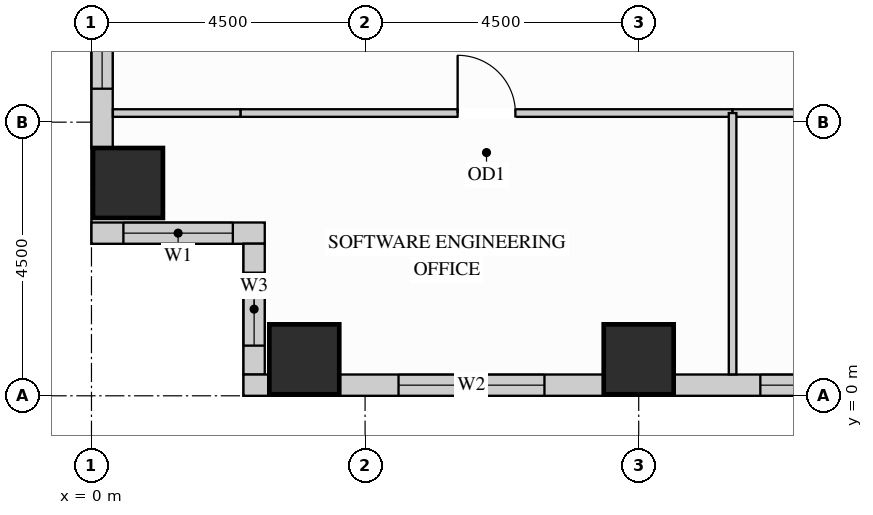
"""IFC4 building model, lengths in metres.
Left out: names, types, materials, properties, quantities, classifications, styles, units other than length and angle.
Written with IfcOpenShell. Run it as: python <this file> out.ifc"""

import sys

from ifc_helpers import new_model, si_unit, direction, frame, frame_2d, origin, origin_2d, place, context, subcontext, project, spatial, rectangle, extrude, source, transform, mapped, element, fill, save


model = new_model("IFC4")
c1 = context("Model", 3, precision=1e-05, world=origin(), true_north=direction((0.0, 1.0)))
c2 = subcontext(c1, "Body", "Model", "MODEL_VIEW")
j1 = project(units=[si_unit("LENGTHUNIT", "METRE"), si_unit("PLANEANGLEUNIT", "RADIAN")], contexts=[c1])
p1 = place(None, origin())
s1 = spatial("IfcSite", under=j1, at=p1, CompositionType="ELEMENT")
p2 = place(p1, origin())
s2 = spatial("IfcBuilding", under=s1, at=p2, CompositionType="ELEMENT")
p3 = place(p2, frame((0.0, 0.0, 77.4)))
s3 = spatial("IfcBuildingStorey", under=s2, at=p3, CompositionType="ELEMENT", Elevation=77.4)
m1 = source(origin(), c2, "Body", "SweptSolid", [
    extrude(rectangle(XDim=1.15, YDim=1.15, at=origin_2d()), origin(), (0.0, 0.0, 1.0), 3.38),
])
for number, where, z_axis, x_axis in (
    (1, (3.5, 0.6, 0.0), (0.0, 0.0, 1.0), (1.0, 0.0, 0.0)),
    (2, (9.0, 0.6, 0.0), (0.0, 0.0, 1.0), (1.0, 0.0, 0.0)),
    (3, (0.6, 3.5, 0.0), (0.0, 0.0, 1.0), (1.0, 0.0, 0.0)),
):
    element("IfcColumn", number, at=place(p3, frame(where, z_axis=z_axis, x_axis=x_axis)), inside=s3, PredefinedType="COLUMN", context=c2, shape_type="MappedRepresentation", body=[
        mapped(m1, transform((0.0, 0.0, 0.0), x_axis=(1.0, 0.0, 0.0), y_axis=(0.0, 1.0, 0.0), z_axis=(0.0, 0.0, 1.0))),
    ])
p4 = place(p3, frame((0.175, 7.927, 0.0), z_axis=(0.0, 0.0, 1.0), x_axis=(0.0, -1.0, 0.0)))
e4 = element("IfcWall", 4, at=p4, inside=s3, PredefinedType="SOLIDWALL", context=c2, shape_type="SweptSolid", body=[
    extrude(rectangle(XDim=3.854, YDim=0.35, at=frame_2d((1.927, 0.0))), origin(), (0.0, 0.0, 1.0), 3.365),
])
p5 = place(p4, frame((0.477, 0.0, 0.78)))
e5 = element("IfcOpeningElement", 5, at=p5, cuts=e4, PredefinedType="OPENING", context=c2, shape_type="SweptSolid", body=[
    extrude(rectangle(XDim=2.4, YDim=2.1, at=frame_2d((1.2, 1.05))), frame((0.0, 0.185, 0.0), z_axis=(0.0, -1.0, 0.0), x_axis=(1.0, 0.0, 0.0)), (0.0, 0.0, 1.0), 0.37),
])
p6 = place(p3, frame((0.0, 2.675, 0.0), z_axis=(0.0, 0.0, 1.0), x_axis=(1.0, 0.0, 0.0)))
e6 = element("IfcWall", 6, at=p6, inside=s3, PredefinedType="SOLIDWALL", context=c2, shape_type="SweptSolid", body=[
    extrude(rectangle(XDim=2.85, YDim=0.35, at=frame_2d((1.425, 0.0))), origin(), (0.0, 0.0, 1.0), 3.365),
])
p7 = place(p6, frame((0.525, 0.0, 0.78)))
e7 = element("IfcOpeningElement", 7, at=p7, cuts=e6, PredefinedType="OPENING", context=c2, shape_type="SweptSolid", body=[
    extrude(rectangle(XDim=1.8, YDim=2.1, at=frame_2d((0.9, 1.05))), frame((0.0, 0.185, 0.0), z_axis=(0.0, -1.0, 0.0), x_axis=(1.0, 0.0, 0.0)), (0.0, 0.0, 1.0), 0.37),
])
p8 = place(p3, frame((2.675, 2.502, 0.0), z_axis=(0.0, 0.0, 1.0), x_axis=(0.0, -1.0, 0.0)))
e8 = element("IfcWall", 8, at=p8, inside=s3, PredefinedType="SOLIDWALL", context=c2, shape_type="SweptSolid", body=[
    extrude(rectangle(XDim=2.154, YDim=0.35, at=frame_2d((1.077, 0.0))), origin(), (0.0, 0.0, 1.0), 3.365),
])
p9 = place(p8, frame((0.477, 0.0, 0.78)))
e9 = element("IfcOpeningElement", 9, at=p9, cuts=e8, PredefinedType="OPENING", context=c2, shape_type="SweptSolid", body=[
    extrude(rectangle(XDim=1.2, YDim=2.1, at=frame_2d((0.6, 1.05))), frame((0.0, 0.185, 0.0), z_axis=(0.0, -1.0, 0.0), x_axis=(1.0, 0.0, 0.0)), (0.0, 0.0, 1.0), 0.37),
])
m2 = source(origin(), c2, "Body", "SweptSolid", [
    extrude(rectangle(XDim=0.427, YDim=0.35, at=frame_2d((0.213, 0.0))), origin(), (0.0, 0.0, 1.0), 3.365),
])
p10 = place(p3, frame((2.5, 0.175, 0.0), z_axis=(0.0, 0.0, 1.0), x_axis=(1.0, 0.0, 0.0)))
e10 = element("IfcWall", 10, at=p10, inside=s3, PredefinedType="SOLIDWALL", context=c2, shape_type="MappedRepresentation", body=[
    mapped(m2, transform((0.0, 0.0, 0.0), x_axis=(1.0, 0.0, 0.0), y_axis=(0.0, 1.0, 0.0), z_axis=(0.0, 0.0, 1.0))),
])
p11 = place(p3, frame((4.073, 0.175, 0.0), z_axis=(0.0, 0.0, 1.0), x_axis=(1.0, 0.0, 0.0)))
e11 = element("IfcWall", 11, at=p11, inside=s3, PredefinedType="SOLIDWALL", context=c2, shape_type="SweptSolid", body=[
    extrude(rectangle(XDim=4.354, YDim=0.35, at=frame_2d((2.177, 0.0))), origin(), (0.0, 0.0, 1.0), 3.365),
])
p12 = place(p11, frame((0.977, 0.0, 0.78)))
e12 = element("IfcOpeningElement", 12, at=p12, cuts=e11, PredefinedType="OPENING", context=c2, shape_type="SweptSolid", body=[
    extrude(rectangle(XDim=2.4, YDim=2.1, at=frame_2d((1.2, 1.05))), frame((0.0, 0.185, 0.0), z_axis=(0.0, -1.0, 0.0), x_axis=(1.0, 0.0, 0.0)), (0.0, 0.0, 1.0), 0.37),
])
p13 = place(p3, frame((9.573, 0.175, 0.0), z_axis=(0.0, 0.0, 1.0), x_axis=(1.0, 0.0, 0.0)))
e13 = element("IfcWall", 13, at=p13, inside=s3, PredefinedType="SOLIDWALL", context=c2, shape_type="SweptSolid", body=[
    extrude(rectangle(XDim=4.354, YDim=0.35, at=frame_2d((2.177, 0.0))), origin(), (0.0, 0.0, 1.0), 3.365),
])
p14 = place(p13, frame((1.427, 0.0, 0.78)))
e14 = element("IfcOpeningElement", 14, at=p14, cuts=e13, PredefinedType="OPENING", context=c2, shape_type="SweptSolid", body=[
    extrude(rectangle(XDim=2.4, YDim=2.1, at=frame_2d((1.2, 1.05))), frame((0.0, 0.185, 0.0), z_axis=(0.0, -1.0, 0.0), x_axis=(1.0, 0.0, 0.0)), (0.0, 0.0, 1.0), 0.37),
])
p15 = place(p3, frame((2.45, 4.65, 0.0), z_axis=(0.0, 0.0, 1.0), x_axis=(1.0, 0.0, 0.0)))
e15 = element("IfcWall", 15, at=p15, inside=s3, PredefinedType="PARTITIONING", context=c2, shape_type="SweptSolid", body=[
    extrude(rectangle(XDim=8.094, YDim=0.125, at=frame_2d((4.047, 0.0))), origin(), (0.0, 0.0, 1.0), 2.828),
])
p16 = place(p15, frame((3.572, 0.0, 0.0)))
e16 = element("IfcOpeningElement", 16, at=p16, cuts=e15, PredefinedType="OPENING", context=c2, shape_type="SweptSolid", body=[
    extrude(rectangle(XDim=0.95, YDim=2.15, at=frame_2d((0.475, 1.075))), frame((0.0, 0.073, 0.0), z_axis=(0.0, -1.0, 0.0), x_axis=(1.0, 0.0, 0.0)), (0.0, 0.0, 1.0), 0.145),
])
p17 = place(p3, frame((10.544, 4.65, 0.0), z_axis=(0.0, 0.0, 1.0), x_axis=(1.0, 0.0, 0.0)))
e17 = element("IfcWall", 17, at=p17, inside=s3, PredefinedType="PARTITIONING", context=c2, shape_type="SweptSolid", body=[
    extrude(rectangle(XDim=6.006, YDim=0.125, at=frame_2d((3.003, 0.0))), origin(), (0.0, 0.0, 1.0), 2.828),
])
p18 = place(p17, frame((2.528, 0.0, 0.0)))
e18 = element("IfcOpeningElement", 18, at=p18, cuts=e17, PredefinedType="OPENING", context=c2, shape_type="SweptSolid", body=[
    extrude(rectangle(XDim=0.95, YDim=2.15, at=frame_2d((0.475, 1.075))), frame((0.0, 0.073, 0.0), z_axis=(0.0, -1.0, 0.0), x_axis=(1.0, 0.0, 0.0)), (0.0, 0.0, 1.0), 0.145),
])
m3 = source(origin(), c2, "Body", "SweptSolid", [
    extrude(rectangle(XDim=2.098, YDim=0.125, at=frame_2d((1.049, 0.0))), origin(), (0.0, 0.0, 1.0), 2.828),
])
p19 = place(p3, frame((0.352, 4.65, 0.0), z_axis=(0.0, 0.0, 1.0), x_axis=(1.0, 0.0, 0.0)))
e19 = element("IfcWall", 19, at=p19, inside=s3, PredefinedType="PARTITIONING", context=c2, shape_type="MappedRepresentation", body=[
    mapped(m3, transform((0.0, 0.0, 0.0), x_axis=(1.0, 0.0, 0.0), y_axis=(0.0, 1.0, 0.0), z_axis=(0.0, 0.0, 1.0))),
])
m4 = source(origin(), c2, "Body", "SweptSolid", [
    extrude(rectangle(XDim=4.298, YDim=0.125, at=frame_2d((2.149, 0.0))), origin(), (0.0, 0.0, 1.0), 3.365),
])
p20 = place(p3, frame((10.544, 0.352, 0.0), z_axis=(0.0, 0.0, 1.0), x_axis=(0.0, 1.0, 0.0)))
e20 = element("IfcWall", 20, at=p20, inside=s3, PredefinedType="PARTITIONING", context=c2, shape_type="MappedRepresentation", body=[
    mapped(m4, transform((0.0, 0.0, 0.0), x_axis=(1.0, 0.0, 0.0), y_axis=(0.0, 1.0, 0.0), z_axis=(0.0, 0.0, 1.0))),
])
m5 = source(origin(), c2, "Body", "SweptSolid", [
    extrude(rectangle(XDim=0.95, YDim=2.15, at=frame_2d((0.475, 1.075))), frame((0.0, 0.025, 0.0), z_axis=(0.0, -1.0, 0.0), x_axis=(1.0, 0.0, 0.0)), (0.0, 0.0, 1.0), 0.05),
])
p21 = place(p16, origin())
e21 = element("IfcDoor", 21, at=p21, inside=s3, OperationType="SINGLE_SWING_LEFT", PredefinedType="DOOR", context=c2, shape_type="MappedRepresentation", body=[
    mapped(m5, transform((0.0, 0.0, 0.0), x_axis=(1.0, 0.0, 0.0), y_axis=(0.0, 1.0, 0.0), z_axis=(0.0, 0.0, 1.0))),
])
fill(e16, e21)
m6 = source(origin(), c2, "Body", "SweptSolid", [
    extrude(rectangle(XDim=1.8, YDim=2.1, at=frame_2d((0.9, 1.05))), frame((0.0, 0.03, 0.0), z_axis=(0.0, -1.0, 0.0), x_axis=(1.0, 0.0, 0.0)), (0.0, 0.0, 1.0), 0.06),
])
p22 = place(p7, origin())
e22 = element("IfcWindow", 22, at=p22, inside=s3, PartitioningType="SINGLE_PANEL", PredefinedType="WINDOW", context=c2, shape_type="MappedRepresentation", body=[
    mapped(m6, transform((0.0, 0.0, 0.0), x_axis=(1.0, 0.0, 0.0), y_axis=(0.0, 1.0, 0.0), z_axis=(0.0, 0.0, 1.0))),
])
fill(e7, e22)
m7 = source(origin(), c2, "Body", "SweptSolid", [
    extrude(rectangle(XDim=2.4, YDim=2.1, at=frame_2d((1.2, 1.05))), frame((0.0, 0.03, 0.0), z_axis=(0.0, -1.0, 0.0), x_axis=(1.0, 0.0, 0.0)), (0.0, 0.0, 1.0), 0.06),
])
p23 = place(p5, origin())
e23 = element("IfcWindow", 23, at=p23, inside=s3, PartitioningType="SINGLE_PANEL", PredefinedType="WINDOW", context=c2, shape_type="MappedRepresentation", body=[
    mapped(m7, transform((0.0, 0.0, 0.0), x_axis=(1.0, 0.0, 0.0), y_axis=(0.0, 1.0, 0.0), z_axis=(0.0, 0.0, 1.0))),
])
fill(e5, e23)
p24 = place(p12, origin())
e24 = element("IfcWindow", 24, at=p24, inside=s3, PartitioningType="SINGLE_PANEL", PredefinedType="WINDOW", context=c2, shape_type="MappedRepresentation", body=[
    mapped(m7, transform((0.0, 0.0, 0.0), x_axis=(1.0, 0.0, 0.0), y_axis=(0.0, 1.0, 0.0), z_axis=(0.0, 0.0, 1.0))),
])
fill(e12, e24)
p25 = place(p14, origin())
e25 = element("IfcWindow", 25, at=p25, inside=s3, PartitioningType="SINGLE_PANEL", PredefinedType="WINDOW", context=c2, shape_type="MappedRepresentation", body=[
    mapped(m7, transform((0.0, 0.0, 0.0), x_axis=(1.0, 0.0, 0.0), y_axis=(0.0, 1.0, 0.0), z_axis=(0.0, 0.0, 1.0))),
])
fill(e14, e25)
m8 = source(origin(), c2, "Body", "SweptSolid", [
    extrude(rectangle(XDim=1.2, YDim=2.1, at=frame_2d((0.6, 1.05))), frame((0.0, 0.03, 0.0), z_axis=(0.0, -1.0, 0.0), x_axis=(1.0, 0.0, 0.0)), (0.0, 0.0, 1.0), 0.06),
])
p26 = place(p9, origin())
e26 = element("IfcWindow", 26, at=p26, inside=s3, PartitioningType="SINGLE_PANEL", PredefinedType="WINDOW", context=c2, shape_type="MappedRepresentation", body=[
    mapped(m8, transform((0.0, 0.0, 0.0), x_axis=(1.0, 0.0, 0.0), y_axis=(0.0, 1.0, 0.0), z_axis=(0.0, 0.0, 1.0))),
])
fill(e9, e26)
save(model, sys.argv[1])
